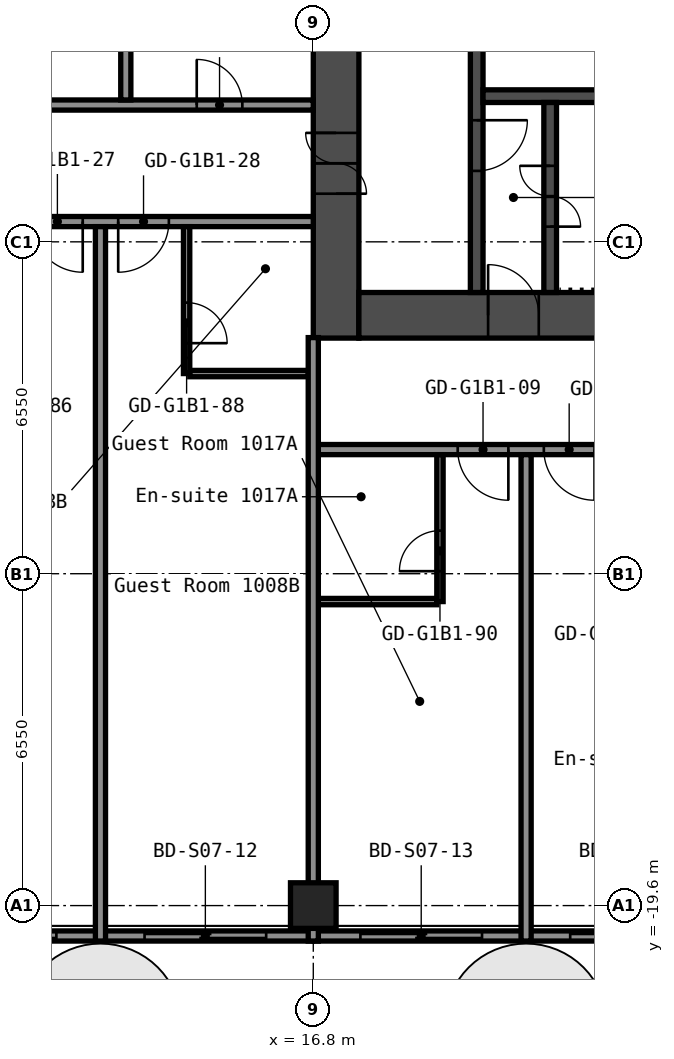
"""IFC4 building model, lengths in metres.
Left out: names, types, materials, properties, quantities, classifications, styles, units other than length and angle.
Written with IfcOpenShell. Run it as: python <this file> out.ifc"""

import sys

from ifc_helpers import new_model, si_unit, direction, frame, frame_2d, origin, origin_2d, place, context, subcontext, project, spatial, rectangle, hollow_rectangle, extrude, element, fill, save


model = new_model("IFC4")
c1 = context("Model", 3, precision=1e-05, world=origin(), true_north=direction((0.0, 1.0)))
c2 = subcontext(c1, "Body", "Model", "MODEL_VIEW")
j1 = project(units=[si_unit("LENGTHUNIT", "METRE"), si_unit("PLANEANGLEUNIT", "RADIAN")], contexts=[c1])
p1 = place(None, origin())
s1 = spatial("IfcSite", under=j1, at=p1, CompositionType="ELEMENT")
p2 = place(p1, origin())
s2 = spatial("IfcBuilding", under=s1, at=p2, CompositionType="ELEMENT")
p3 = place(p2, frame((0.0, 0.0, 39.0)))
s3 = spatial("IfcBuildingStorey", under=s2, at=p3, CompositionType="ELEMENT", Elevation=39.0)
p4 = place(p3, frame((16.8, -19.6, 0.0), z_axis=(0.0, 0.0, 1.0), x_axis=(1.0, 0.0, 0.0)))
e1 = element("IfcColumn", 1, at=p4, inside=s3, PredefinedType="COLUMN", context=c2, shape_type="SweptSolid", body=[
    extrude(hollow_rectangle(XDim=0.9, YDim=0.9, WallThickness=0.036, at=origin_2d()), origin(), (0.0, 0.0, 1.0), 2.8),
])
p5 = place(p3, frame((17.25, -8.4, 0.0), z_axis=(0.0, 0.0, 1.0), x_axis=(0.0, 1.0, 0.0)))
e2 = element("IfcWall", 2, at=p5, inside=s3, PredefinedType="SHEAR", context=c2, shape_type="SweptSolid", body=[
    extrude(rectangle(XDim=16.8, YDim=0.9, at=frame_2d((8.4, 0.0))), origin(), (0.0, 0.0, 1.0), 2.8),
])
p6 = place(p5, frame((12.75, 0.0, 0.0)))
e3 = element("IfcOpeningElement", 3, at=p6, cuts=e2, PredefinedType="OPENING", context=c2, shape_type="SweptSolid", body=[
    extrude(rectangle(XDim=1.2, YDim=2.1, at=frame_2d((0.6, 1.05))), frame((0.0, 0.46, 0.0), z_axis=(0.0, -1.0, 0.0), x_axis=(1.0, 0.0, 0.0)), (0.0, 0.0, 1.0), 0.92),
])
p7 = place(p5, frame((2.85, 0.0, 0.0)))
e4 = element("IfcOpeningElement", 4, at=p7, cuts=e2, PredefinedType="OPENING", context=c2, shape_type="SweptSolid", body=[
    extrude(rectangle(XDim=1.2, YDim=2.1, at=frame_2d((0.6, 1.05))), frame((0.0, 0.46, 0.0), z_axis=(0.0, -1.0, 0.0), x_axis=(1.0, 0.0, 0.0)), (0.0, 0.0, 1.0), 0.92),
])
p8 = place(p3, frame((17.7, -7.95, 0.0), z_axis=(0.0, 0.0, 1.0), x_axis=(1.0, 0.0, 0.0)))
e5 = element("IfcWall", 5, at=p8, inside=s3, PredefinedType="SHEAR", context=c2, shape_type="SweptSolid", body=[
    extrude(rectangle(XDim=15.0, YDim=0.9, at=frame_2d((7.5, 0.0))), origin(), (0.0, 0.0, 1.0), 2.8),
])
p9 = place(p8, frame((2.55, 0.0, 0.0)))
e6 = element("IfcOpeningElement", 6, at=p9, cuts=e5, PredefinedType="OPENING", context=c2, shape_type="SweptSolid", body=[
    extrude(rectangle(XDim=1.0, YDim=2.1, at=frame_2d((0.5, 1.05))), frame((0.0, 0.46, 0.0), z_axis=(0.0, -1.0, 0.0), x_axis=(1.0, 0.0, 0.0)), (0.0, 0.0, 1.0), 0.92),
])
p10 = place(p3, frame((20.025, -7.5, 0.0), z_axis=(0.0, 0.0, 1.0), x_axis=(0.0, 1.0, 0.0)))
e7 = element("IfcWall", 7, at=p10, inside=s3, PredefinedType="SHEAR", context=c2, shape_type="SweptSolid", body=[
    extrude(rectangle(XDim=6.3, YDim=0.25, at=frame_2d((3.15, 0.0))), origin(), (0.0, 0.0, 1.0), 2.8),
])
p11 = place(p10, frame((2.4, 0.0, 0.0)))
e8 = element("IfcOpeningElement", 8, at=p11, cuts=e7, PredefinedType="OPENING", context=c2, shape_type="SweptSolid", body=[
    extrude(rectangle(XDim=1.0, YDim=2.1, at=frame_2d((0.5, 1.05))), frame((0.0, 0.135, 0.0), z_axis=(0.0, -1.0, 0.0), x_axis=(1.0, 0.0, 0.0)), (0.0, 0.0, 1.0), 0.27),
])
p12 = place(p3, frame((20.15, -3.625, 0.0), z_axis=(0.0, 0.0, 1.0), x_axis=(1.0, 0.0, 0.0)))
e9 = element("IfcWall", 9, at=p12, inside=s3, PredefinedType="SHEAR", context=c2, shape_type="SweptSolid", body=[
    extrude(rectangle(XDim=7.5, YDim=0.25, at=frame_2d((3.75, 0.0))), origin(), (0.0, 0.0, 1.0), 2.8),
])
p13 = place(p3, frame((21.475, -7.5, 0.0), z_axis=(0.0, 0.0, 1.0), x_axis=(0.0, 1.0, 0.0)))
e10 = element("IfcWall", 10, at=p13, inside=s3, PredefinedType="SHEAR", context=c2, shape_type="SweptSolid", body=[
    extrude(rectangle(XDim=3.75, YDim=0.25, at=frame_2d((1.875, 0.0))), origin(), (0.0, 0.0, 1.0), 2.8),
])
p14 = place(p13, frame((1.3, 0.0, 0.0)))
e11 = element("IfcOpeningElement", 11, at=p14, cuts=e10, PredefinedType="OPENING", context=c2, shape_type="SweptSolid", body=[
    extrude(rectangle(XDim=1.2, YDim=2.1, at=frame_2d((0.6, 1.05))), frame((0.0, 0.135, 0.0), z_axis=(0.0, -1.0, 0.0), x_axis=(1.0, 0.0, 0.0)), (0.0, 0.0, 1.0), 0.27),
])
p15 = place(p3, frame((16.9, -13.6, 0.0), z_axis=(0.0, 0.0, 1.0), x_axis=(1.0, 0.0, 0.0)))
e12 = element("IfcWall", 12, at=p15, inside=s3, PredefinedType="PARTITIONING", context=c2, shape_type="SweptSolid", body=[
    extrude(rectangle(XDim=2.338, YDim=0.125, at=frame_2d((1.169, 0.0))), origin(), (0.0, 0.0, 1.0), 2.8),
])
p16 = place(p3, frame((16.8, -10.6, 0.0), z_axis=(0.0, 0.0, 1.0), x_axis=(1.0, 0.0, 0.0)))
e13 = element("IfcWall", 13, at=p16, inside=s3, PredefinedType="PARTITIONING", context=c2, shape_type="SweptSolid", body=[
    extrude(rectangle(XDim=34.3, YDim=0.2, at=frame_2d((17.15, 0.0))), origin(), (0.0, 0.0, 1.0), 2.8),
])
p17 = place(p16, frame((2.85, 0.0, 0.0)))
e14 = element("IfcOpeningElement", 14, at=p17, cuts=e13, PredefinedType="OPENING", context=c2, shape_type="SweptSolid", body=[
    extrude(rectangle(XDim=1.0, YDim=2.1, at=frame_2d((0.5, 1.05))), frame((0.0, 0.11, 0.0), z_axis=(0.0, -1.0, 0.0), x_axis=(1.0, 0.0, 0.0)), (0.0, 0.0, 1.0), 0.22),
])
p18 = place(p16, frame((4.55, 0.0, 0.0)))
e15 = element("IfcOpeningElement", 15, at=p18, cuts=e13, PredefinedType="OPENING", context=c2, shape_type="SweptSolid", body=[
    extrude(rectangle(XDim=1.0, YDim=2.1, at=frame_2d((0.5, 1.05))), frame((0.0, 0.11, 0.0), z_axis=(0.0, -1.0, 0.0), x_axis=(1.0, 0.0, 0.0)), (0.0, 0.0, 1.0), 0.22),
])
p19 = place(p16, frame((11.25, 0.0, 0.0)))
e16 = element("IfcOpeningElement", 16, at=p19, cuts=e13, PredefinedType="OPENING", context=c2, shape_type="SweptSolid", body=[
    extrude(rectangle(XDim=1.0, YDim=2.1, at=frame_2d((0.5, 1.05))), frame((0.0, 0.11, 0.0), z_axis=(0.0, -1.0, 0.0), x_axis=(1.0, 0.0, 0.0)), (0.0, 0.0, 1.0), 0.22),
])
p20 = place(p16, frame((12.95, 0.0, 0.0)))
e17 = element("IfcOpeningElement", 17, at=p20, cuts=e13, PredefinedType="OPENING", context=c2, shape_type="SweptSolid", body=[
    extrude(rectangle(XDim=1.0, YDim=2.1, at=frame_2d((0.5, 1.05))), frame((0.0, 0.11, 0.0), z_axis=(0.0, -1.0, 0.0), x_axis=(1.0, 0.0, 0.0)), (0.0, 0.0, 1.0), 0.22),
])
p21 = place(p16, frame((19.65, 0.0, 0.0)))
e18 = element("IfcOpeningElement", 18, at=p21, cuts=e13, PredefinedType="OPENING", context=c2, shape_type="SweptSolid", body=[
    extrude(rectangle(XDim=1.0, YDim=2.1, at=frame_2d((0.5, 1.05))), frame((0.0, 0.11, 0.0), z_axis=(0.0, -1.0, 0.0), x_axis=(1.0, 0.0, 0.0)), (0.0, 0.0, 1.0), 0.22),
])
p22 = place(p16, frame((21.35, 0.0, 0.0)))
e19 = element("IfcOpeningElement", 19, at=p22, cuts=e13, PredefinedType="OPENING", context=c2, shape_type="SweptSolid", body=[
    extrude(rectangle(XDim=1.0, YDim=2.1, at=frame_2d((0.5, 1.05))), frame((0.0, 0.11, 0.0), z_axis=(0.0, -1.0, 0.0), x_axis=(1.0, 0.0, 0.0)), (0.0, 0.0, 1.0), 0.22),
])
p23 = place(p16, frame((28.15, 0.0, 0.0)))
e20 = element("IfcOpeningElement", 20, at=p23, cuts=e13, PredefinedType="OPENING", context=c2, shape_type="SweptSolid", body=[
    extrude(rectangle(XDim=1.0, YDim=2.1, at=frame_2d((0.5, 1.05))), frame((0.0, 0.11, 0.0), z_axis=(0.0, -1.0, 0.0), x_axis=(1.0, 0.0, 0.0)), (0.0, 0.0, 1.0), 0.22),
])
p24 = place(p16, frame((30.05, 0.0, 0.0)))
e21 = element("IfcOpeningElement", 21, at=p24, cuts=e13, PredefinedType="OPENING", context=c2, shape_type="SweptSolid", body=[
    extrude(rectangle(XDim=1.0, YDim=2.1, at=frame_2d((0.5, 1.05))), frame((0.0, 0.11, 0.0), z_axis=(0.0, -1.0, 0.0), x_axis=(1.0, 0.0, 0.0)), (0.0, 0.0, 1.0), 0.22),
])
p25 = place(p3, frame((14.363, -9.1, 0.0), z_axis=(0.0, 0.0, 1.0), x_axis=(1.0, 0.0, 0.0)))
e22 = element("IfcWall", 22, at=p25, inside=s3, PredefinedType="PARTITIONING", context=c2, shape_type="SweptSolid", body=[
    extrude(rectangle(XDim=2.337, YDim=0.125, at=frame_2d((1.169, 0.0))), origin(), (0.0, 0.0, 1.0), 2.8),
])
p26 = place(p3, frame((-16.8, -6.1, 0.0), z_axis=(0.0, 0.0, 1.0), x_axis=(1.0, 0.0, 0.0)))
e23 = element("IfcWall", 23, at=p26, inside=s3, PredefinedType="PARTITIONING", context=c2, shape_type="SweptSolid", body=[
    extrude(rectangle(XDim=33.6, YDim=0.2, at=frame_2d((16.8, 0.0))), origin(), (0.0, 0.0, 1.0), 2.8),
])
p27 = place(p26, frame((2.85, 0.0, 0.0)))
e24 = element("IfcOpeningElement", 24, at=p27, cuts=e23, PredefinedType="OPENING", context=c2, shape_type="SweptSolid", body=[
    extrude(rectangle(XDim=1.0, YDim=2.1, at=frame_2d((0.5, 1.05))), frame((0.0, 0.11, 0.0), z_axis=(0.0, -1.0, 0.0), x_axis=(1.0, 0.0, 0.0)), (0.0, 0.0, 1.0), 0.22),
])
p28 = place(p26, frame((4.55, 0.0, 0.0)))
e25 = element("IfcOpeningElement", 25, at=p28, cuts=e23, PredefinedType="OPENING", context=c2, shape_type="SweptSolid", body=[
    extrude(rectangle(XDim=1.0, YDim=2.1, at=frame_2d((0.5, 1.05))), frame((0.0, 0.11, 0.0), z_axis=(0.0, -1.0, 0.0), x_axis=(1.0, 0.0, 0.0)), (0.0, 0.0, 1.0), 0.22),
])
p29 = place(p26, frame((11.25, 0.0, 0.0)))
e26 = element("IfcOpeningElement", 26, at=p29, cuts=e23, PredefinedType="OPENING", context=c2, shape_type="SweptSolid", body=[
    extrude(rectangle(XDim=1.0, YDim=2.1, at=frame_2d((0.5, 1.05))), frame((0.0, 0.11, 0.0), z_axis=(0.0, -1.0, 0.0), x_axis=(1.0, 0.0, 0.0)), (0.0, 0.0, 1.0), 0.22),
])
p30 = place(p26, frame((12.95, 0.0, 0.0)))
e27 = element("IfcOpeningElement", 27, at=p30, cuts=e23, PredefinedType="OPENING", context=c2, shape_type="SweptSolid", body=[
    extrude(rectangle(XDim=1.0, YDim=2.1, at=frame_2d((0.5, 1.05))), frame((0.0, 0.11, 0.0), z_axis=(0.0, -1.0, 0.0), x_axis=(1.0, 0.0, 0.0)), (0.0, 0.0, 1.0), 0.22),
])
p31 = place(p26, frame((18.28, 0.0, 0.0)))
e28 = element("IfcOpeningElement", 28, at=p31, cuts=e23, PredefinedType="OPENING", context=c2, shape_type="SweptSolid", body=[
    extrude(rectangle(XDim=0.9, YDim=2.1, at=frame_2d((0.45, 1.05))), frame((0.0, 0.11, 0.0), z_axis=(0.0, -1.0, 0.0), x_axis=(1.0, 0.0, 0.0)), (0.0, 0.0, 1.0), 0.22),
])
p32 = place(p26, frame((22.48, 0.0, 0.0)))
e29 = element("IfcOpeningElement", 29, at=p32, cuts=e23, PredefinedType="OPENING", context=c2, shape_type="SweptSolid", body=[
    extrude(rectangle(XDim=0.9, YDim=2.1, at=frame_2d((0.45, 1.05))), frame((0.0, 0.11, 0.0), z_axis=(0.0, -1.0, 0.0), x_axis=(1.0, 0.0, 0.0)), (0.0, 0.0, 1.0), 0.22),
])
p33 = place(p26, frame((28.05, 0.0, 0.0)))
e30 = element("IfcOpeningElement", 30, at=p33, cuts=e23, PredefinedType="OPENING", context=c2, shape_type="SweptSolid", body=[
    extrude(rectangle(XDim=1.0, YDim=2.1, at=frame_2d((0.5, 1.05))), frame((0.0, 0.11, 0.0), z_axis=(0.0, -1.0, 0.0), x_axis=(1.0, 0.0, 0.0)), (0.0, 0.0, 1.0), 0.22),
])
p34 = place(p26, frame((29.75, 0.0, 0.0)))
e31 = element("IfcOpeningElement", 31, at=p34, cuts=e23, PredefinedType="OPENING", context=c2, shape_type="SweptSolid", body=[
    extrude(rectangle(XDim=1.0, YDim=2.1, at=frame_2d((0.5, 1.05))), frame((0.0, 0.11, 0.0), z_axis=(0.0, -1.0, 0.0), x_axis=(1.0, 0.0, 0.0)), (0.0, 0.0, 1.0), 0.22),
])
p35 = place(p3, frame((-16.8, -3.8, 0.0), z_axis=(0.0, 0.0, 1.0), x_axis=(1.0, 0.0, 0.0)))
e32 = element("IfcWall", 32, at=p35, inside=s3, PredefinedType="PARTITIONING", context=c2, shape_type="SweptSolid", body=[
    extrude(rectangle(XDim=33.6, YDim=0.2, at=frame_2d((16.8, 0.0))), origin(), (0.0, 0.0, 1.0), 2.8),
])
p36 = place(p35, frame((10.22, 0.0, 0.0)))
e33 = element("IfcOpeningElement", 33, at=p36, cuts=e32, PredefinedType="OPENING", context=c2, shape_type="SweptSolid", body=[
    extrude(rectangle(XDim=0.9, YDim=2.1, at=frame_2d((0.45, 1.05))), frame((0.0, 0.11, 0.0), z_axis=(0.0, -1.0, 0.0), x_axis=(1.0, 0.0, 0.0)), (0.0, 0.0, 1.0), 0.22),
])
p37 = place(p35, frame((14.42, 0.0, 0.0)))
e34 = element("IfcOpeningElement", 34, at=p37, cuts=e32, PredefinedType="OPENING", context=c2, shape_type="SweptSolid", body=[
    extrude(rectangle(XDim=0.9, YDim=2.1, at=frame_2d((0.45, 1.05))), frame((0.0, 0.11, 0.0), z_axis=(0.0, -1.0, 0.0), x_axis=(1.0, 0.0, 0.0)), (0.0, 0.0, 1.0), 0.22),
])
p38 = place(p35, frame((27.1, 0.0, 0.0)))
e35 = element("IfcOpeningElement", 35, at=p38, cuts=e32, PredefinedType="OPENING", context=c2, shape_type="SweptSolid", body=[
    extrude(rectangle(XDim=0.9, YDim=2.1, at=frame_2d((0.45, 1.05))), frame((0.0, 0.11, 0.0), z_axis=(0.0, -1.0, 0.0), x_axis=(1.0, 0.0, 0.0)), (0.0, 0.0, 1.0), 0.22),
])
p39 = place(p35, frame((31.3, 0.0, 0.0)))
e36 = element("IfcOpeningElement", 36, at=p39, cuts=e32, PredefinedType="OPENING", context=c2, shape_type="SweptSolid", body=[
    extrude(rectangle(XDim=0.9, YDim=2.1, at=frame_2d((0.45, 1.05))), frame((0.0, 0.11, 0.0), z_axis=(0.0, -1.0, 0.0), x_axis=(1.0, 0.0, 0.0)), (0.0, 0.0, 1.0), 0.22),
])
p40 = place(p3, frame((12.6, -20.3, 0.0), z_axis=(0.0, 0.0, 1.0), x_axis=(0.0, 1.0, 0.0)))
e37 = element("IfcWall", 37, at=p40, inside=s3, PredefinedType="PARTITIONING", context=c2, shape_type="SweptSolid", body=[
    extrude(rectangle(XDim=14.1, YDim=0.2, at=frame_2d((7.05, 0.0))), origin(), (0.0, 0.0, 1.0), 2.8),
])
p41 = place(p3, frame((13.1, -3.7, 0.0), z_axis=(0.0, 0.0, 1.0), x_axis=(0.0, 1.0, 0.0)))
e38 = element("IfcWall", 38, at=p41, inside=s3, PredefinedType="PARTITIONING", context=c2, shape_type="SweptSolid", body=[
    extrude(rectangle(XDim=7.4, YDim=0.2, at=frame_2d((3.7, 0.0))), origin(), (0.0, 0.0, 1.0), 2.8),
])
p42 = place(p3, frame((14.3, -9.1, 0.0), z_axis=(0.0, 0.0, 1.0), x_axis=(0.0, 1.0, 0.0)))
e39 = element("IfcWall", 39, at=p42, inside=s3, PredefinedType="PARTITIONING", context=c2, shape_type="SweptSolid", body=[
    extrude(rectangle(XDim=2.9, YDim=0.125, at=frame_2d((1.45, 0.0))), origin(), (0.0, 0.0, 1.0), 2.8),
])
p43 = place(p42, frame((0.6, 0.0, 0.0)))
e40 = element("IfcOpeningElement", 40, at=p43, cuts=e39, PredefinedType="OPENING", context=c2, shape_type="SweptSolid", body=[
    extrude(rectangle(XDim=0.8, YDim=2.1, at=frame_2d((0.4, 1.05))), frame((0.0, 0.073, 0.0), z_axis=(0.0, -1.0, 0.0), x_axis=(1.0, 0.0, 0.0)), (0.0, 0.0, 1.0), 0.145),
])
p44 = place(p3, frame((16.8, -20.3, 0.0), z_axis=(0.0, 0.0, 1.0), x_axis=(0.0, 1.0, 0.0)))
e41 = element("IfcWall", 41, at=p44, inside=s3, PredefinedType="PARTITIONING", context=c2, shape_type="SweptSolid", body=[
    extrude(rectangle(XDim=11.91, YDim=0.2, at=frame_2d((5.955, 0.0))), origin(), (0.0, 0.0, 1.0), 2.8),
])
p45 = place(p3, frame((19.3, -13.6, 0.0), z_axis=(0.0, 0.0, 1.0), x_axis=(0.0, 1.0, 0.0)))
e42 = element("IfcWall", 42, at=p45, inside=s3, PredefinedType="PARTITIONING", context=c2, shape_type="SweptSolid", body=[
    extrude(rectangle(XDim=2.9, YDim=0.125, at=frame_2d((1.45, 0.0))), origin(), (0.0, 0.0, 1.0), 2.8),
])
p46 = place(p45, frame((0.6, 0.0, 0.0)))
e43 = element("IfcOpeningElement", 43, at=p46, cuts=e42, PredefinedType="OPENING", context=c2, shape_type="SweptSolid", body=[
    extrude(rectangle(XDim=0.8, YDim=2.1, at=frame_2d((0.4, 1.05))), frame((0.0, 0.073, 0.0), z_axis=(0.0, -1.0, 0.0), x_axis=(1.0, 0.0, 0.0)), (0.0, 0.0, 1.0), 0.145),
])
p47 = place(p3, frame((21.0, -20.3, 0.0), z_axis=(0.0, 0.0, 1.0), x_axis=(0.0, 1.0, 0.0)))
e44 = element("IfcWall", 44, at=p47, inside=s3, PredefinedType="PARTITIONING", context=c2, shape_type="SweptSolid", body=[
    extrude(rectangle(XDim=9.6, YDim=0.2, at=frame_2d((4.8, 0.0))), origin(), (0.0, 0.0, 1.0), 2.8),
])
p48 = place(p3, frame((8.42, -20.2, 0.0), z_axis=(0.0, 0.0, 1.0), x_axis=(1.0, 0.0, 0.0)))
p49 = place(p48, frame((0.91, 0.0, 0.0)))
p50 = place(p49, frame((2.4, 0.0, 0.0), z_axis=(0.0, 0.0, 1.0), x_axis=(-1.0, 0.0, 0.0)))
e45 = element("IfcDoor", 45, at=p50, inside=s3, OperationType="SLIDING_TO_LEFT", PredefinedType="DOOR", context=c2, shape_type="SweptSolid", body=[
    extrude(rectangle(XDim=2.4, YDim=2.2, at=frame_2d((1.2, 1.1))), frame((0.0, 0.025, 0.0), z_axis=(0.0, -1.0, 0.0), x_axis=(1.0, 0.0, 0.0)), (0.0, 0.0, 1.0), 0.05),
])
p51 = place(p3, frame((12.56, -20.2, 0.0), z_axis=(0.0, 0.0, 1.0), x_axis=(1.0, 0.0, 0.0)))
p52 = place(p51, frame((0.91, 0.0, 0.0)))
p53 = place(p52, frame((2.4, 0.0, 0.0), z_axis=(0.0, 0.0, 1.0), x_axis=(-1.0, 0.0, 0.0)))
e46 = element("IfcDoor", 46, at=p53, inside=s3, OperationType="SLIDING_TO_LEFT", PredefinedType="DOOR", context=c2, shape_type="SweptSolid", body=[
    extrude(rectangle(XDim=2.4, YDim=2.2, at=frame_2d((1.2, 1.1))), frame((0.0, 0.025, 0.0), z_axis=(0.0, -1.0, 0.0), x_axis=(1.0, 0.0, 0.0)), (0.0, 0.0, 1.0), 0.05),
])
p54 = place(p3, frame((16.82, -20.2, 0.0), z_axis=(0.0, 0.0, 1.0), x_axis=(1.0, 0.0, 0.0)))
p55 = place(p54, frame((0.91, 0.0, 0.0)))
p56 = place(p55, frame((2.4, 0.0, 0.0), z_axis=(0.0, 0.0, 1.0), x_axis=(-1.0, 0.0, 0.0)))
e47 = element("IfcDoor", 47, at=p56, inside=s3, OperationType="SLIDING_TO_LEFT", PredefinedType="DOOR", context=c2, shape_type="SweptSolid", body=[
    extrude(rectangle(XDim=2.4, YDim=2.2, at=frame_2d((1.2, 1.1))), frame((0.0, 0.025, 0.0), z_axis=(0.0, -1.0, 0.0), x_axis=(1.0, 0.0, 0.0)), (0.0, 0.0, 1.0), 0.05),
])
p57 = place(p3, frame((20.96, -20.2, 0.0), z_axis=(0.0, 0.0, 1.0), x_axis=(1.0, 0.0, 0.0)))
p58 = place(p57, frame((0.91, 0.0, 0.0)))
p59 = place(p58, frame((2.4, 0.0, 0.0), z_axis=(0.0, 0.0, 1.0), x_axis=(-1.0, 0.0, 0.0)))
e48 = element("IfcDoor", 48, at=p59, inside=s3, OperationType="SLIDING_TO_LEFT", PredefinedType="DOOR", context=c2, shape_type="SweptSolid", body=[
    extrude(rectangle(XDim=2.4, YDim=2.2, at=frame_2d((1.2, 1.1))), frame((0.0, 0.025, 0.0), z_axis=(0.0, -1.0, 0.0), x_axis=(1.0, 0.0, 0.0)), (0.0, 0.0, 1.0), 0.05),
])
p60 = place(p7, origin())
e49 = element("IfcDoor", 49, at=p60, inside=s3, OperationType="DOUBLE_DOOR_SINGLE_SWING", PredefinedType="DOOR", context=c2, shape_type="SweptSolid", body=[
    extrude(rectangle(XDim=1.2, YDim=2.1, at=frame_2d((0.6, 1.05))), frame((0.0, 0.025, 0.0), z_axis=(0.0, -1.0, 0.0), x_axis=(1.0, 0.0, 0.0)), (0.0, 0.0, 1.0), 0.05),
])
fill(e4, e49)
p61 = place(p9, origin())
e50 = element("IfcDoor", 50, at=p61, inside=s3, OperationType="SINGLE_SWING_RIGHT", PredefinedType="DOOR", context=c2, shape_type="SweptSolid", body=[
    extrude(rectangle(XDim=1.0, YDim=2.1, at=frame_2d((0.5, 1.05))), frame((0.0, 0.025, 0.0), z_axis=(0.0, -1.0, 0.0), x_axis=(1.0, 0.0, 0.0)), (0.0, 0.0, 1.0), 0.05),
])
fill(e6, e50)
p62 = place(p14, origin())
e51 = element("IfcDoor", 51, at=p62, inside=s3, OperationType="DOUBLE_DOOR_SINGLE_SWING", PredefinedType="DOOR", context=c2, shape_type="SweptSolid", body=[
    extrude(rectangle(XDim=1.2, YDim=2.1, at=frame_2d((0.6, 1.05))), frame((0.0, 0.025, 0.0), z_axis=(0.0, -1.0, 0.0), x_axis=(1.0, 0.0, 0.0)), (0.0, 0.0, 1.0), 0.05),
])
fill(e11, e51)
p63 = place(p11, origin())
e52 = element("IfcDoor", 52, at=p63, inside=s3, OperationType="SINGLE_SWING_RIGHT", PredefinedType="DOOR", context=c2, shape_type="SweptSolid", body=[
    extrude(rectangle(XDim=1.0, YDim=2.1, at=frame_2d((0.5, 1.05))), frame((0.0, 0.025, 0.0), z_axis=(0.0, -1.0, 0.0), x_axis=(1.0, 0.0, 0.0)), (0.0, 0.0, 1.0), 0.05),
])
fill(e8, e52)
p64 = place(p17, origin())
e53 = element("IfcDoor", 53, at=p64, inside=s3, OperationType="SINGLE_SWING_RIGHT", PredefinedType="DOOR", context=c2, shape_type="SweptSolid", body=[
    extrude(rectangle(XDim=1.0, YDim=2.1, at=frame_2d((0.5, 1.05))), frame((0.0, 0.025, 0.0), z_axis=(0.0, -1.0, 0.0), x_axis=(1.0, 0.0, 0.0)), (0.0, 0.0, 1.0), 0.05),
])
fill(e14, e53)
p65 = place(p18, origin())
e54 = element("IfcDoor", 54, at=p65, inside=s3, OperationType="SINGLE_SWING_RIGHT", PredefinedType="DOOR", context=c2, shape_type="SweptSolid", body=[
    extrude(rectangle(XDim=1.0, YDim=2.1, at=frame_2d((0.5, 1.05))), frame((0.0, 0.025, 0.0), z_axis=(0.0, -1.0, 0.0), x_axis=(1.0, 0.0, 0.0)), (0.0, 0.0, 1.0), 0.05),
])
fill(e15, e54)
p66 = place(p33, origin())
e55 = element("IfcDoor", 55, at=p66, inside=s3, OperationType="SINGLE_SWING_RIGHT", PredefinedType="DOOR", context=c2, shape_type="SweptSolid", body=[
    extrude(rectangle(XDim=1.0, YDim=2.1, at=frame_2d((0.5, 1.05))), frame((0.0, 0.025, 0.0), z_axis=(0.0, -1.0, 0.0), x_axis=(1.0, 0.0, 0.0)), (0.0, 0.0, 1.0), 0.05),
])
fill(e30, e55)
p67 = place(p34, origin())
e56 = element("IfcDoor", 56, at=p67, inside=s3, OperationType="SINGLE_SWING_LEFT", PredefinedType="DOOR", context=c2, shape_type="SweptSolid", body=[
    extrude(rectangle(XDim=1.0, YDim=2.1, at=frame_2d((0.5, 1.05))), frame((0.0, 0.025, 0.0), z_axis=(0.0, -1.0, 0.0), x_axis=(1.0, 0.0, 0.0)), (0.0, 0.0, 1.0), 0.05),
])
fill(e31, e56)
p68 = place(p39, origin())
e57 = element("IfcDoor", 57, at=p68, inside=s3, OperationType="SINGLE_SWING_RIGHT", PredefinedType="DOOR", context=c2, shape_type="SweptSolid", body=[
    extrude(rectangle(XDim=0.9, YDim=2.1, at=frame_2d((0.45, 1.05))), frame((0.0, 0.025, 0.0), z_axis=(0.0, -1.0, 0.0), x_axis=(1.0, 0.0, 0.0)), (0.0, 0.0, 1.0), 0.05),
])
fill(e36, e57)
p69 = place(p43, origin())
e58 = element("IfcDoor", 58, at=p69, inside=s3, OperationType="SINGLE_SWING_LEFT", PredefinedType="DOOR", context=c2, shape_type="SweptSolid", body=[
    extrude(rectangle(XDim=0.8, YDim=2.1, at=frame_2d((0.4, 1.05))), frame((0.0, 0.025, 0.0), z_axis=(0.0, -1.0, 0.0), x_axis=(1.0, 0.0, 0.0)), (0.0, 0.0, 1.0), 0.05),
])
fill(e40, e58)
p70 = place(p46, origin())
e59 = element("IfcDoor", 59, at=p70, inside=s3, OperationType="SINGLE_SWING_RIGHT", PredefinedType="DOOR", context=c2, shape_type="SweptSolid", body=[
    extrude(rectangle(XDim=0.8, YDim=2.1, at=frame_2d((0.4, 1.05))), frame((0.0, 0.025, 0.0), z_axis=(0.0, -1.0, 0.0), x_axis=(1.0, 0.0, 0.0)), (0.0, 0.0, 1.0), 0.05),
])
fill(e43, e59)
save(model, sys.argv[1])
